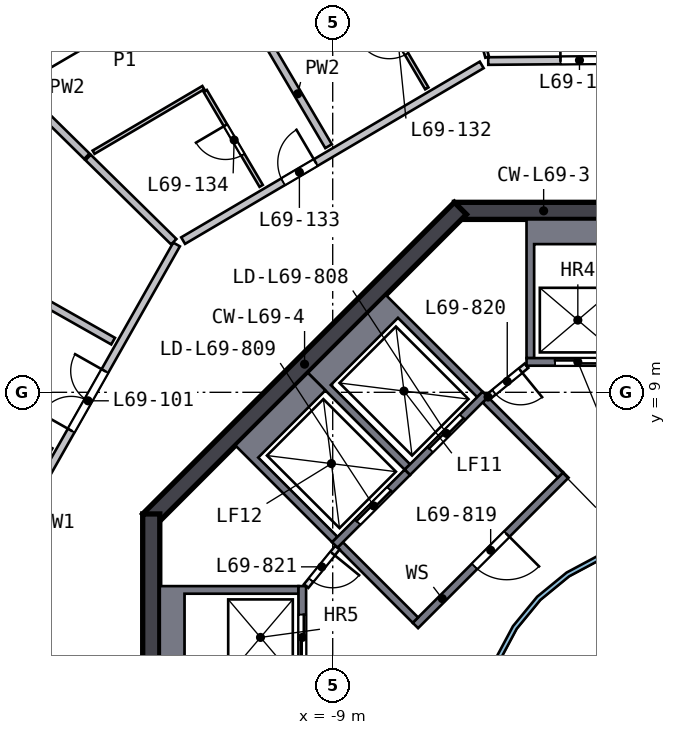
"""IFC4 building model, lengths in metres.
Left out: names, types, materials, properties, quantities, classifications, styles, units other than length and angle.
Written with IfcOpenShell. Run it as: python <this file> out.ifc"""

import sys

from ifc_helpers import new_model, si_unit, direction, frame, frame_2d, origin, place, context, subcontext, project, spatial, polyline, rectangle, outline, extrude, element, fill, save


model = new_model("IFC4")
c1 = context("Model", 3, precision=1e-05, world=origin(), true_north=direction((0.0, 1.0)))
c2 = subcontext(c1, "Body", "Model", "MODEL_VIEW")
j1 = project(units=[si_unit("LENGTHUNIT", "METRE"), si_unit("PLANEANGLEUNIT", "RADIAN")], contexts=[c1])
p1 = place(None, origin())
s1 = spatial("IfcSite", under=j1, at=p1, CompositionType="ELEMENT")
p2 = place(p1, origin())
s2 = spatial("IfcBuilding", under=s1, at=p2, CompositionType="ELEMENT")
p3 = place(p2, frame((0.0, 0.0, 281.0)))
s3 = spatial("IfcBuildingStorey", under=s2, at=p3, CompositionType="ELEMENT", Elevation=281.0)
p4 = place(p3, frame((5.799, 13.775, 0.0), z_axis=(0.0, 0.0, 1.0), x_axis=(-1.0, 0.0, 0.0)))
e1 = element("IfcWall", 1, at=p4, inside=s3, PredefinedType="SHEAR", context=c2, shape_type="SweptSolid", body=[
    extrude(rectangle(XDim=11.598, YDim=0.45, at=frame_2d((5.799, 0.0))), origin(), (0.0, 0.0, 1.0), 3.5),
])
p5 = place(p4, frame((4.899, 0.0, 0.0)))
e2 = element("IfcOpeningElement", 2, at=p5, cuts=e1, PredefinedType="OPENING", context=c2, shape_type="SweptSolid", body=[
    extrude(rectangle(XDim=1.8, YDim=2.1, at=frame_2d((0.9, 1.05))), frame((0.0, 0.235, 0.0), z_axis=(0.0, -1.0, 0.0), x_axis=(1.0, 0.0, 0.0)), (0.0, 0.0, 1.0), 0.47),
])
p6 = place(p3, frame((-5.64, 13.841, 0.0), z_axis=(0.0, 0.0, 1.0), x_axis=(-0.707106781, -0.707106781, 0.0)))
e3 = element("IfcWall", 3, at=p6, inside=s3, PredefinedType="SHEAR", context=c2, shape_type="SweptSolid", body=[
    extrude(rectangle(XDim=11.598, YDim=0.45, at=frame_2d((5.799, 0.0))), origin(), (0.0, 0.0, 1.0), 3.5),
])
p7 = place(p3, frame((-13.775, 5.799, 0.0), z_axis=(0.0, 0.0, 1.0), x_axis=(0.0, -1.0, 0.0)))
e4 = element("IfcWall", 4, at=p7, inside=s3, PredefinedType="SHEAR", context=c2, shape_type="SweptSolid", body=[
    extrude(rectangle(XDim=11.598, YDim=0.45, at=frame_2d((5.799, 0.0))), origin(), (0.0, 0.0, 1.0), 3.5),
])
p8 = place(p7, frame((4.899, 0.0, 0.0)))
e5 = element("IfcOpeningElement", 5, at=p8, cuts=e4, PredefinedType="OPENING", context=c2, shape_type="SweptSolid", body=[
    extrude(rectangle(XDim=1.8, YDim=2.1, at=frame_2d((0.9, 1.05))), frame((0.0, 0.235, 0.0), z_axis=(0.0, -1.0, 0.0), x_axis=(1.0, 0.0, 0.0)), (0.0, 0.0, 1.0), 0.47),
])
p9 = place(p3, origin())
e6 = element("IfcWall", 6, at=p9, inside=s3, PredefinedType="SOLIDWALL", context=c2, shape_type="SweptSolid", body=[
    extrude(outline(polyline([(-3.9, 13.55), (-1.2, 13.55), (-1.2, 9.9), (-1.4, 9.9), (-1.4, 12.9), (-3.7, 12.9), (-3.7, 9.9), (-3.9, 9.9), (-3.9, 13.55)])), origin(), (0.0, 0.0, 1.0), 3.19),
])
p10 = place(p3, frame((-1.2, 9.8, 0.0), z_axis=(0.0, 0.0, 1.0), x_axis=(-1.0, 0.0, 0.0)))
e7 = element("IfcWall", 7, at=p10, inside=s3, PredefinedType="SOLIDWALL", context=c2, shape_type="SweptSolid", body=[
    extrude(rectangle(XDim=2.7, YDim=0.2, at=frame_2d((1.35, 0.0))), origin(), (0.0, 0.0, 1.0), 3.19),
])
p11 = place(p10, frame((0.75, 0.0, 0.0)))
e8 = element("IfcOpeningElement", 8, at=p11, cuts=e7, PredefinedType="OPENING", context=c2, shape_type="SweptSolid", body=[
    extrude(rectangle(XDim=1.2, YDim=2.1, at=frame_2d((0.6, 1.05))), frame((0.0, 0.11, 0.0), z_axis=(0.0, -1.0, 0.0), x_axis=(1.0, 0.0, 0.0)), (0.0, 0.0, 1.0), 0.22),
])
p12 = place(p3, origin())
e9 = element("IfcWall", 9, at=p12, inside=s3, PredefinedType="SOLIDWALL", context=c2, shape_type="SweptSolid", body=[
    extrude(outline(polyline([(-13.55, 3.9), (-9.9, 3.9), (-9.9, 3.7), (-12.9, 3.7), (-12.9, 1.4), (-9.9, 1.4), (-9.9, 1.2), (-13.55, 1.2), (-13.55, 3.9)])), origin(), (0.0, 0.0, 1.0), 3.19),
])
p13 = place(p3, frame((-9.8, 1.2, 0.0), z_axis=(0.0, 0.0, 1.0), x_axis=(0.0, 1.0, 0.0)))
e10 = element("IfcWall", 10, at=p13, inside=s3, PredefinedType="SOLIDWALL", context=c2, shape_type="SweptSolid", body=[
    extrude(rectangle(XDim=2.7, YDim=0.2, at=frame_2d((1.35, 0.0))), origin(), (0.0, 0.0, 1.0), 3.19),
])
p14 = place(p13, frame((0.75, 0.0, 0.0)))
e11 = element("IfcOpeningElement", 11, at=p14, cuts=e10, PredefinedType="OPENING", context=c2, shape_type="SweptSolid", body=[
    extrude(rectangle(XDim=1.2, YDim=2.1, at=frame_2d((0.6, 1.05))), frame((0.0, 0.11, 0.0), z_axis=(0.0, -1.0, 0.0), x_axis=(1.0, 0.0, 0.0)), (0.0, 0.0, 1.0), 0.22),
])
p15 = place(p3, origin())
e12 = element("IfcWall", 12, at=p15, inside=s3, PredefinedType="SOLIDWALL", context=c2, shape_type="SweptSolid", body=[
    extrude(outline(polyline([(-9.652, 9.51), (-7.601, 11.561), (-5.056, 9.016), (-5.197, 8.874), (-7.283, 10.96), (-9.051, 9.192), (-6.965, 7.106), (-7.106, 6.965), (-9.652, 9.51)])), origin(), (0.0, 0.0, 1.0), 3.19),
])
p16 = place(p3, frame((-4.985, 8.945, 0.0), z_axis=(0.0, 0.0, 1.0), x_axis=(-0.707106781, -0.707106781, 0.0)))
e13 = element("IfcWall", 13, at=p16, inside=s3, PredefinedType="SOLIDWALL", context=c2, shape_type="SweptSolid", body=[
    extrude(rectangle(XDim=2.9, YDim=0.2, at=frame_2d((1.45, 0.0))), origin(), (0.0, 0.0, 1.0), 3.19),
])
p17 = place(p16, frame((0.85, 0.0, 0.0)))
e14 = element("IfcOpeningElement", 14, at=p17, cuts=e13, PredefinedType="OPENING", context=c2, shape_type="SweptSolid", body=[
    extrude(rectangle(XDim=1.2, YDim=2.1, at=frame_2d((0.6, 1.05))), frame((0.0, 0.11, 0.0), z_axis=(0.0, -1.0, 0.0), x_axis=(1.0, 0.0, 0.0)), (0.0, 0.0, 1.0), 0.22),
])
p18 = place(p3, origin())
e15 = element("IfcWall", 15, at=p18, inside=s3, PredefinedType="SOLIDWALL", context=c2, shape_type="SweptSolid", body=[
    extrude(outline(polyline([(-11.561, 7.601), (-9.652, 9.51), (-9.192, 9.051), (-10.96, 7.283), (-8.874, 5.197), (-9.016, 5.056), (-11.561, 7.601)])), origin(), (0.0, 0.0, 1.0), 3.19),
])
p19 = place(p3, frame((-7.036, 6.894, 0.0), z_axis=(0.0, 0.0, 1.0), x_axis=(-0.707106781, -0.707106781, 0.0)))
e16 = element("IfcWall", 16, at=p19, inside=s3, PredefinedType="SOLIDWALL", context=c2, shape_type="SweptSolid", body=[
    extrude(rectangle(XDim=2.7, YDim=0.2, at=frame_2d((1.35, 0.0))), origin(), (0.0, 0.0, 1.0), 3.19),
])
p20 = place(p19, frame((0.65, 0.0, 0.0)))
e17 = element("IfcOpeningElement", 17, at=p20, cuts=e16, PredefinedType="OPENING", context=c2, shape_type="SweptSolid", body=[
    extrude(rectangle(XDim=1.2, YDim=2.1, at=frame_2d((0.6, 1.05))), frame((0.0, 0.11, 0.0), z_axis=(0.0, -1.0, 0.0), x_axis=(1.0, 0.0, 0.0)), (0.0, 0.0, 1.0), 0.22),
])
p21 = place(p3, frame((-2.864, 6.823, 0.0), z_axis=(0.0, 0.0, 1.0), x_axis=(-0.707106781, -0.707106781, 0.0)))
e18 = element("IfcWall", 18, at=p21, inside=s3, PredefinedType="SOLIDWALL", context=c2, shape_type="SweptSolid", body=[
    extrude(rectangle(XDim=5.6, YDim=0.2, at=frame_2d((2.8, 0.0))), origin(), (0.0, 0.0, 1.0), 3.19),
])
p22 = place(p21, frame((2.2, 0.0, 0.0)))
e19 = element("IfcOpeningElement", 19, at=p22, cuts=e18, PredefinedType="OPENING", context=c2, shape_type="SweptSolid", body=[
    extrude(rectangle(XDim=1.2, YDim=2.1, at=frame_2d((0.6, 1.05))), frame((0.0, 0.11, 0.0), z_axis=(0.0, -1.0, 0.0), x_axis=(1.0, 0.0, 0.0)), (0.0, 0.0, 1.0), 0.22),
])
for number, where, z_axis, x_axis in (
    (20, (-3.005, 6.823, 0.0), (0.0, 0.0, 1.0), (-0.707, 0.707, 0.0)),
    (21, (-6.823, 3.005, 0.0), (0.0, 0.0, 1.0), (-0.707, 0.707, 0.0)),
):
    element("IfcWall", number, at=place(p3, frame(where, z_axis=z_axis, x_axis=x_axis)), inside=s3, PredefinedType="SOLIDWALL", context=c2, shape_type="SweptSolid", body=[
        extrude(rectangle(XDim=2.8, YDim=0.2, at=frame_2d((1.4, 0.0))), origin(), (0.0, 0.0, 1.0), 3.19),
    ])
p23 = place(p3, frame((-3.9, 9.7, 0.0), z_axis=(0.0, 0.0, 1.0), x_axis=(-0.775559878, -0.631274009, 0.0)))
e22 = element("IfcWall", 22, at=p23, inside=s3, PredefinedType="PARTITIONING", context=c2, shape_type="SweptSolid", body=[
    extrude(rectangle(XDim=1.308, YDim=0.15, at=frame_2d((0.654, 0.0))), origin(), (0.0, 0.0, 1.0), 3.19),
])
p24 = place(p23, frame((0.204, 0.0, 0.0)))
e23 = element("IfcOpeningElement", 23, at=p24, cuts=e22, PredefinedType="OPENING", context=c2, shape_type="SweptSolid", body=[
    extrude(rectangle(XDim=0.9, YDim=2.1, at=frame_2d((0.45, 1.05))), frame((0.0, 0.085, 0.0), z_axis=(0.0, -1.0, 0.0), x_axis=(1.0, 0.0, 0.0)), (0.0, 0.0, 1.0), 0.17),
])
p25 = place(p3, frame((-8.874, 4.914, 0.0), z_axis=(0.0, 0.0, 1.0), x_axis=(-0.631274009, -0.775559878, 0.0)))
e24 = element("IfcWall", 24, at=p25, inside=s3, PredefinedType="PARTITIONING", context=c2, shape_type="SweptSolid", body=[
    extrude(rectangle(XDim=1.308, YDim=0.15, at=frame_2d((0.654, 0.0))), origin(), (0.0, 0.0, 1.0), 3.19),
])
p26 = place(p25, frame((0.204, 0.0, 0.0)))
e25 = element("IfcOpeningElement", 25, at=p26, cuts=e24, PredefinedType="OPENING", context=c2, shape_type="SweptSolid", body=[
    extrude(rectangle(XDim=0.9, YDim=2.1, at=frame_2d((0.45, 1.05))), frame((0.0, 0.085, 0.0), z_axis=(0.0, -1.0, 0.0), x_axis=(1.0, 0.0, 0.0)), (0.0, 0.0, 1.0), 0.17),
])
p27 = place(p3, origin())
e26 = element("IfcWall", 26, at=p27, inside=s3, PredefinedType="SOLIDWALL", context=c2, shape_type="SweptSolid", body=[
    extrude(outline(polyline([(5.021, -0.999), (4.73, -1.959), (4.257, -2.844), (3.62, -3.62), (2.844, -4.257), (1.959, -4.73), (0.999, -5.021), (0.0, -5.12), (-0.999, -5.021), (-1.959, -4.73), (-2.844, -4.257), (-3.62, -3.62), (-4.257, -2.844), (-4.73, -1.959), (-5.021, -0.999), (-5.12, 0.0), (-5.021, 0.999), (-4.73, 1.959), (-4.257, 2.844), (-3.62, 3.62), (-2.844, 4.257), (-1.959, 4.73), (-0.999, 5.021), (0.0, 5.12), (0.999, 5.021), (1.959, 4.73), (2.844, 4.257), (3.62, 3.62), (4.257, 2.844), (4.73, 1.959), (5.021, 0.999), (5.12, 0.0), (5.021, -0.999)]), holes=[polyline([(4.904, 0.976), (4.619, 1.913), (4.157, 2.778), (3.535, 3.535), (2.778, 4.157), (1.913, 4.619), (0.976, 4.904), (0.0, 5.0), (-0.976, 4.904), (-1.913, 4.619), (-2.778, 4.157), (-3.535, 3.535), (-4.157, 2.778), (-4.619, 1.913), (-4.904, 0.976), (-5.0, 0.0), (-4.904, -0.976), (-4.619, -1.913), (-4.157, -2.778), (-3.535, -3.535), (-2.778, -4.157), (-1.913, -4.619), (-0.976, -4.904), (0.0, -5.0), (0.976, -4.904), (1.913, -4.619), (2.778, -4.157), (3.535, -3.535), (4.157, -2.778), (4.619, -1.913), (4.904, -0.976), (5.0, 0.0), (4.904, 0.976)])]), origin(), (0.0, 0.0, 1.0), 3.19),
])
p28 = place(p3, frame((-17.807, 4.592, 0.0), z_axis=(0.0, 0.0, 1.0), x_axis=(0.492730275, 0.870182094, 0.0)))
e27 = element("IfcWall", 27, at=p28, inside=s3, PredefinedType="SOLIDWALL", context=c2, shape_type="SweptSolid", body=[
    extrude(rectangle(XDim=9.537, YDim=0.2, at=frame_2d((4.768, 0.0))), origin(), (0.0, 0.0, 1.0), 3.19),
])
p29 = place(p28, frame((3.909, 0.0, 0.0)))
e28 = element("IfcOpeningElement", 28, at=p29, cuts=e27, PredefinedType="OPENING", context=c2, shape_type="SweptSolid", body=[
    extrude(rectangle(XDim=1.8, YDim=2.1, at=frame_2d((0.9, 1.05))), frame((0.0, 0.11, 0.0), z_axis=(0.0, -1.0, 0.0), x_axis=(1.0, 0.0, 0.0)), (0.0, 0.0, 1.0), 0.22),
])
p30 = place(p3, frame((-12.936, 12.992, 0.0), z_axis=(0.0, 0.0, 1.0), x_axis=(0.861805451, 0.507238962, 0.0)))
e29 = element("IfcWall", 29, at=p30, inside=s3, PredefinedType="SOLIDWALL", context=c2, shape_type="SweptSolid", body=[
    extrude(rectangle(XDim=9.116, YDim=0.2, at=frame_2d((4.558, 0.0))), origin(), (0.0, 0.0, 1.0), 3.19),
])
p31 = place(p30, frame((3.05, 0.0, 0.0)))
e30 = element("IfcOpeningElement", 30, at=p31, cuts=e29, PredefinedType="OPENING", context=c2, shape_type="SweptSolid", body=[
    extrude(rectangle(XDim=1.0, YDim=2.1, at=frame_2d((0.5, 1.05))), frame((0.0, 0.11, 0.0), z_axis=(0.0, -1.0, 0.0), x_axis=(1.0, 0.0, 0.0)), (0.0, 0.0, 1.0), 0.22),
])
p32 = place(p3, frame((-4.907, 17.718, 0.0), z_axis=(0.0, 0.0, 1.0), x_axis=(0.999964838, 0.008385889, 0.0)))
e31 = element("IfcWall", 31, at=p32, inside=s3, PredefinedType="SOLIDWALL", context=c2, shape_type="SweptSolid", body=[
    extrude(rectangle(XDim=9.316, YDim=0.2, at=frame_2d((4.658, 0.0))), origin(), (0.0, 0.0, 1.0), 3.19),
])
p33 = place(p32, frame((1.9, 0.0, 0.0)))
e32 = element("IfcOpeningElement", 32, at=p33, cuts=e31, PredefinedType="OPENING", context=c2, shape_type="SweptSolid", body=[
    extrude(rectangle(XDim=1.0, YDim=2.1, at=frame_2d((0.5, 1.05))), frame((0.0, 0.11, 0.0), z_axis=(0.0, -1.0, 0.0), x_axis=(1.0, 0.0, 0.0)), (0.0, 0.0, 1.0), 0.22),
])
p34 = place(p3, frame((-16.425, 7.439, 0.0), z_axis=(0.0, 0.0, 1.0), x_axis=(-0.870179021, 0.492735701, 0.0)))
e33 = element("IfcWall", 33, at=p34, inside=s3, PredefinedType="SOLIDWALL", context=c2, shape_type="SweptSolid", body=[
    extrude(rectangle(XDim=10.302, YDim=0.2, at=frame_2d((5.151, 0.0))), origin(), (0.0, 0.0, 1.0), 3.19),
])
p35 = place(p34, frame((2.95, 0.0, 0.0)))
e34 = element("IfcOpeningElement", 34, at=p35, cuts=e33, PredefinedType="OPENING", context=c2, shape_type="SweptSolid", body=[
    extrude(rectangle(XDim=1.0, YDim=2.1, at=frame_2d((0.5, 1.05))), frame((0.0, 0.11, 0.0), z_axis=(0.0, -1.0, 0.0), x_axis=(1.0, 0.0, 0.0)), (0.0, 0.0, 1.0), 0.22),
])
p36 = place(p3, frame((-23.743, 15.423, 0.0), z_axis=(0.0, 0.0, 1.0), x_axis=(0.870179021, -0.492735701, 0.0)))
e35 = element("IfcWall", 35, at=p36, inside=s3, PredefinedType="SOLIDWALL", context=c2, shape_type="SweptSolid", body=[
    extrude(rectangle(XDim=10.302, YDim=0.2, at=frame_2d((5.151, 0.0))), origin(), (0.0, 0.0, 1.0), 3.19),
])
p37 = place(p36, frame((2.5, 0.0, 0.0)))
e36 = element("IfcOpeningElement", 36, at=p37, cuts=e35, PredefinedType="OPENING", context=c2, shape_type="SweptSolid", body=[
    extrude(rectangle(XDim=1.0, YDim=2.1, at=frame_2d((0.5, 1.05))), frame((0.0, 0.11, 0.0), z_axis=(0.0, -1.0, 0.0), x_axis=(1.0, 0.0, 0.0)), (0.0, 0.0, 1.0), 0.22),
])
p38 = place(p3, frame((-17.8, 17.504, 0.0), z_axis=(0.0, 0.0, 1.0), x_axis=(0.712982605, -0.70118172, 0.0)))
e37 = element("IfcWall", 37, at=p38, inside=s3, PredefinedType="SOLIDWALL", context=c2, shape_type="SweptSolid", body=[
    extrude(rectangle(XDim=3.269, YDim=0.2, at=frame_2d((1.634, 0.0))), origin(), (0.0, 0.0, 1.0), 3.19),
])
p39 = place(p3, frame((-15.436, 15.18, 0.0), z_axis=(0.0, 0.0, 1.0), x_axis=(0.712990217, -0.70117398, 0.0)))
e38 = element("IfcWall", 38, at=p39, inside=s3, PredefinedType="SOLIDWALL", context=c2, shape_type="SweptSolid", body=[
    extrude(rectangle(XDim=3.161, YDim=0.2, at=frame_2d((1.581, 0.0))), origin(), (0.0, 0.0, 1.0), 3.19),
])
p40 = place(p3, frame((-9.109, 15.477, 0.0), z_axis=(0.0, 0.0, 1.0), x_axis=(-0.507263495, 0.861791011, 0.0)))
e39 = element("IfcWall", 39, at=p40, inside=s3, PredefinedType="SOLIDWALL", context=c2, shape_type="SweptSolid", body=[
    extrude(rectangle(XDim=3.2, YDim=0.2, at=frame_2d((1.6, 0.0))), origin(), (0.0, 0.0, 1.0), 3.19),
])
p41 = place(p3, frame((-15.292, 15.319, 0.0), z_axis=(0.0, 0.0, 1.0), x_axis=(0.861789934, 0.507265325, 0.0)))
e40 = element("IfcWall", 40, at=p41, inside=s3, PredefinedType="PARTITIONING", context=c2, shape_type="SweptSolid", body=[
    extrude(rectangle(XDim=3.35, YDim=0.1, at=frame_2d((1.675, 0.0))), origin(), (0.0, 0.0, 1.0), 3.19),
])
p42 = place(p3, frame((-10.883, 14.433, 0.0), z_axis=(0.0, 0.0, 1.0), x_axis=(-0.507222463, 0.861815162, 0.0)))
e41 = element("IfcWall", 41, at=p42, inside=s3, PredefinedType="PARTITIONING", context=c2, shape_type="SweptSolid", body=[
    extrude(rectangle(XDim=2.9, YDim=0.1, at=frame_2d((1.45, 0.0))), origin(), (0.0, 0.0, 1.0), 3.19),
])
p43 = place(p42, frame((0.95, 0.0, 0.0)))
e42 = element("IfcOpeningElement", 42, at=p43, cuts=e41, PredefinedType="OPENING", context=c2, shape_type="SweptSolid", body=[
    extrude(rectangle(XDim=0.9, YDim=2.1, at=frame_2d((0.45, 1.05))), frame((0.0, 0.06, 0.0), z_axis=(0.0, -1.0, 0.0), x_axis=(1.0, 0.0, 0.0)), (0.0, 0.0, 1.0), 0.12),
])
p44 = place(p3, frame((-6.524, 16.998, 0.0), z_axis=(0.0, 0.0, 1.0), x_axis=(-0.507263495, 0.861791011, 0.0)))
e43 = element("IfcWall", 43, at=p44, inside=s3, PredefinedType="PARTITIONING", context=c2, shape_type="SweptSolid", body=[
    extrude(rectangle(XDim=3.2, YDim=0.1, at=frame_2d((1.6, 0.0))), origin(), (0.0, 0.0, 1.0), 3.19),
])
p45 = place(p44, frame((1.05, 0.0, 0.0)))
e44 = element("IfcOpeningElement", 44, at=p45, cuts=e43, PredefinedType="OPENING", context=c2, shape_type="SweptSolid", body=[
    extrude(rectangle(XDim=0.9, YDim=2.1, at=frame_2d((0.45, 1.05))), frame((0.0, 0.06, 0.0), z_axis=(0.0, -1.0, 0.0), x_axis=(1.0, 0.0, 0.0)), (0.0, 0.0, 1.0), 0.12),
])
p46 = place(p3, frame((-4.935, 17.818, 0.0), z_axis=(0.0, 0.0, 1.0), x_axis=(-0.266914636, 0.963720176, 0.0)))
e45 = element("IfcWall", 45, at=p46, inside=s3, PredefinedType="PARTITIONING", context=c2, shape_type="SweptSolid", body=[
    extrude(rectangle(XDim=6.476, YDim=0.1, at=frame_2d((3.238, 0.0))), origin(), (0.0, 0.0, 1.0), 3.19),
])
p47 = place(p46, frame((3.55, 0.0, 0.0)))
e46 = element("IfcOpeningElement", 46, at=p47, cuts=e45, PredefinedType="OPENING", context=c2, shape_type="SweptSolid", body=[
    extrude(rectangle(XDim=1.0, YDim=2.1, at=frame_2d((0.5, 1.05))), frame((0.0, 0.06, 0.0), z_axis=(0.0, -1.0, 0.0), x_axis=(1.0, 0.0, 0.0)), (0.0, 0.0, 1.0), 0.12),
])
p48 = place(p11, origin())
e47 = element("IfcDoor", 47, at=p48, inside=s3, OperationType="DOUBLE_DOOR_SLIDING", PredefinedType="DOOR", context=c2, shape_type="SweptSolid", body=[
    extrude(rectangle(XDim=1.2, YDim=2.1, at=frame_2d((0.6, 1.05))), frame((0.0, 0.025, 0.0), z_axis=(0.0, -1.0, 0.0), x_axis=(1.0, 0.0, 0.0)), (0.0, 0.0, 1.0), 0.05),
])
fill(e8, e47)
p49 = place(p14, origin())
e48 = element("IfcDoor", 48, at=p49, inside=s3, OperationType="DOUBLE_DOOR_SLIDING", PredefinedType="DOOR", context=c2, shape_type="SweptSolid", body=[
    extrude(rectangle(XDim=1.2, YDim=2.1, at=frame_2d((0.6, 1.05))), frame((0.0, 0.025, 0.0), z_axis=(0.0, -1.0, 0.0), x_axis=(1.0, 0.0, 0.0)), (0.0, 0.0, 1.0), 0.05),
])
fill(e11, e48)
p50 = place(p17, origin())
e49 = element("IfcDoor", 49, at=p50, inside=s3, OperationType="DOUBLE_DOOR_SLIDING", PredefinedType="DOOR", context=c2, shape_type="SweptSolid", body=[
    extrude(rectangle(XDim=1.2, YDim=2.1, at=frame_2d((0.6, 1.05))), frame((0.0, 0.025, 0.0), z_axis=(0.0, -1.0, 0.0), x_axis=(1.0, 0.0, 0.0)), (0.0, 0.0, 1.0), 0.05),
])
fill(e14, e49)
p51 = place(p20, origin())
e50 = element("IfcDoor", 50, at=p51, inside=s3, OperationType="DOUBLE_DOOR_SLIDING", PredefinedType="DOOR", context=c2, shape_type="SweptSolid", body=[
    extrude(rectangle(XDim=1.2, YDim=2.1, at=frame_2d((0.6, 1.05))), frame((0.0, 0.025, 0.0), z_axis=(0.0, -1.0, 0.0), x_axis=(1.0, 0.0, 0.0)), (0.0, 0.0, 1.0), 0.05),
])
fill(e17, e50)
p52 = place(p22, origin())
e51 = element("IfcDoor", 51, at=p52, inside=s3, OperationType="SINGLE_SWING_LEFT", PredefinedType="DOOR", context=c2, shape_type="SweptSolid", body=[
    extrude(rectangle(XDim=1.2, YDim=2.1, at=frame_2d((0.6, 1.05))), frame((0.0, 0.025, 0.0), z_axis=(0.0, -1.0, 0.0), x_axis=(1.0, 0.0, 0.0)), (0.0, 0.0, 1.0), 0.05),
])
fill(e19, e51)
p53 = place(p24, origin())
e52 = element("IfcDoor", 52, at=p53, inside=s3, OperationType="SINGLE_SWING_LEFT", PredefinedType="DOOR", context=c2, shape_type="SweptSolid", body=[
    extrude(rectangle(XDim=0.9, YDim=2.1, at=frame_2d((0.45, 1.05))), frame((0.0, 0.025, 0.0), z_axis=(0.0, -1.0, 0.0), x_axis=(1.0, 0.0, 0.0)), (0.0, 0.0, 1.0), 0.05),
])
fill(e23, e52)
p54 = place(p26, origin())
e53 = element("IfcDoor", 53, at=p54, inside=s3, OperationType="SINGLE_SWING_LEFT", PredefinedType="DOOR", context=c2, shape_type="SweptSolid", body=[
    extrude(rectangle(XDim=0.9, YDim=2.1, at=frame_2d((0.45, 1.05))), frame((0.0, 0.025, 0.0), z_axis=(0.0, -1.0, 0.0), x_axis=(1.0, 0.0, 0.0)), (0.0, 0.0, 1.0), 0.05),
])
fill(e25, e53)
p55 = place(p29, origin())
e54 = element("IfcDoor", 54, at=p55, inside=s3, OperationType="DOUBLE_DOOR_SINGLE_SWING", PredefinedType="DOOR", context=c2, shape_type="SweptSolid", body=[
    extrude(rectangle(XDim=1.8, YDim=2.1, at=frame_2d((0.9, 1.05))), frame((0.0, 0.025, 0.0), z_axis=(0.0, -1.0, 0.0), x_axis=(1.0, 0.0, 0.0)), (0.0, 0.0, 1.0), 0.05),
])
fill(e28, e54)
p56 = place(p33, origin())
e55 = element("IfcDoor", 55, at=p56, inside=s3, OperationType="SINGLE_SWING_LEFT", PredefinedType="DOOR", context=c2, shape_type="SweptSolid", body=[
    extrude(rectangle(XDim=1.0, YDim=2.1, at=frame_2d((0.5, 1.05))), frame((0.0, 0.025, 0.0), z_axis=(0.0, -1.0, 0.0), x_axis=(1.0, 0.0, 0.0)), (0.0, 0.0, 1.0), 0.05),
])
fill(e32, e55)
p57 = place(p45, origin())
e56 = element("IfcDoor", 56, at=p57, inside=s3, OperationType="SINGLE_SWING_RIGHT", PredefinedType="DOOR", context=c2, shape_type="SweptSolid", body=[
    extrude(rectangle(XDim=0.9, YDim=2.1, at=frame_2d((0.45, 1.05))), frame((0.0, 0.025, 0.0), z_axis=(0.0, -1.0, 0.0), x_axis=(1.0, 0.0, 0.0)), (0.0, 0.0, 1.0), 0.05),
])
fill(e44, e56)
p58 = place(p31, origin())
e57 = element("IfcDoor", 57, at=p58, inside=s3, OperationType="SINGLE_SWING_RIGHT", PredefinedType="DOOR", context=c2, shape_type="SweptSolid", body=[
    extrude(rectangle(XDim=1.0, YDim=2.1, at=frame_2d((0.5, 1.05))), frame((0.0, 0.025, 0.0), z_axis=(0.0, -1.0, 0.0), x_axis=(1.0, 0.0, 0.0)), (0.0, 0.0, 1.0), 0.05),
])
fill(e30, e57)
p59 = place(p43, origin())
e58 = element("IfcDoor", 58, at=p59, inside=s3, OperationType="SINGLE_SWING_RIGHT", PredefinedType="DOOR", context=c2, shape_type="SweptSolid", body=[
    extrude(rectangle(XDim=0.9, YDim=2.1, at=frame_2d((0.45, 1.05))), frame((0.0, 0.025, 0.0), z_axis=(0.0, -1.0, 0.0), x_axis=(1.0, 0.0, 0.0)), (0.0, 0.0, 1.0), 0.05),
])
fill(e42, e58)
save(model, sys.argv[1])
